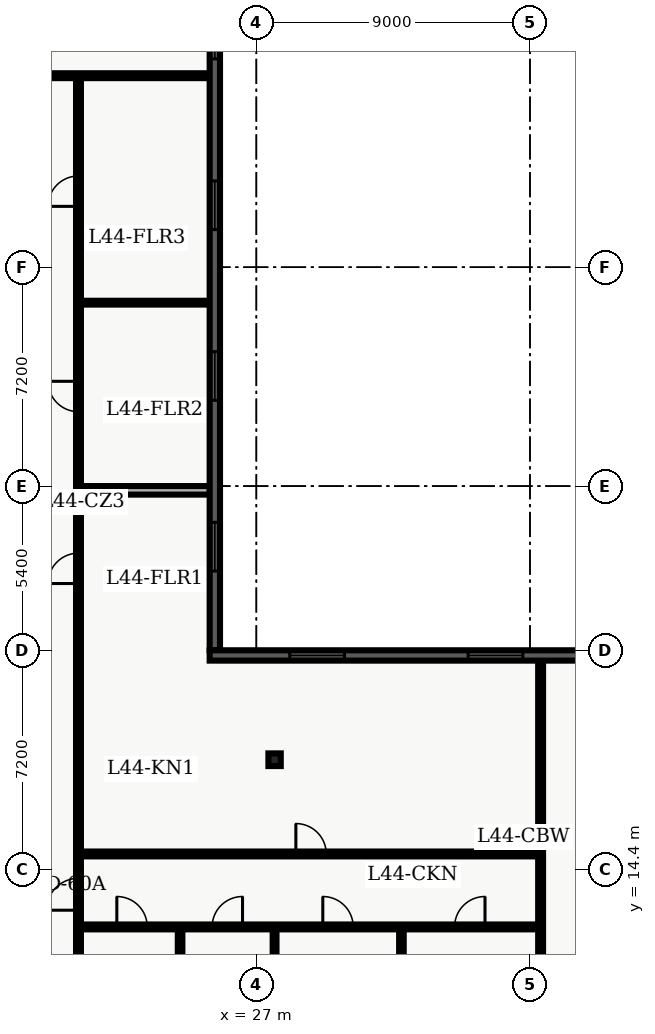
"""IFC4 building model, lengths in metres.
Left out: names, types, materials, properties, quantities, classifications, styles, units other than length and angle.
Written with IfcOpenShell. Run it as: python <this file> out.ifc"""

import sys

from ifc_helpers import new_model, entity, si_unit, converted_unit, direction, frame, origin_with_axes, origin_2d_with_axis, place, context, subcontext, project, spatial, polyline, rectangle, i_section, outline, extrude, element, fill, save


model = new_model("IFC4")
c1 = context("Model", 3, precision=1e-05, world=origin_with_axes(), true_north=direction((0.0, 1.0)))
c2 = subcontext(c1, "Body", "Model", "MODEL_VIEW")
j1 = project(units=[si_unit("LENGTHUNIT", "METRE"), converted_unit("PLANEANGLEUNIT", "DEGREE", entity("IfcPlaneAngleMeasure", 0.017), si_unit("PLANEANGLEUNIT", "RADIAN"), dimensions=[0, 0, 0, 0, 0, 0, 0])], contexts=[c1])
p1 = place(None, origin_with_axes())
s1 = spatial("IfcSite", under=j1, at=p1, CompositionType="ELEMENT")
p2 = place(p1, origin_with_axes())
s2 = spatial("IfcBuilding", under=s1, at=p2, CompositionType="ELEMENT")
p3 = place(p2, frame((0.0, 0.0, 179.7), z_axis=(0.0, 0.0, 1.0), x_axis=(1.0, 0.0, 0.0)))
s3 = spatial("IfcBuildingStorey", under=s2, at=p3, CompositionType="ELEMENT", Elevation=179.7)
p4 = place(p3, frame((27.6, 18.0, 0.0), z_axis=(0.0, 0.0, 1.0), x_axis=(1.0, 0.0, 0.0)))
e1 = element("IfcColumn", 1, at=p4, inside=s3, PredefinedType="COLUMN", context=c2, shape_type="SweptSolid", body=[
    extrude(i_section(OverallWidth=0.406, OverallDepth=0.416, WebThickness=0.03, FlangeThickness=0.048, FilletRadius=0.022, at=origin_2d_with_axis()), origin_with_axes(), (0.0, 0.0, 1.0), 3.9),
])
p5 = place(p3, frame((2.6, 40.5, 0.0), z_axis=(0.0, 0.0, 1.0), x_axis=(1.0, 0.0, 0.0)))
e2 = element("IfcWall", 2, at=p5, inside=s3, PredefinedType="PARTITIONING", context=c2, shape_type="SweptSolid", body=[
    extrude(outline(polyline([(0.0, -0.08), (22.87, -0.08), (22.87, 0.08), (0.0, 0.08), (0.0, -0.08)])), origin_with_axes(), (0.0, 0.0, 1.0), 2.7),
])
p6 = place(p5, frame((2.386, 0.0, 0.0), z_axis=(0.0, 0.0, 1.0), x_axis=(1.0, 0.0, 0.0)))
e3 = element("IfcOpeningElement", 3, at=p6, cuts=e2, PredefinedType="OPENING", context=c2, shape_type="SweptSolid", body=[
    extrude(rectangle(XDim=1.0, YDim=0.18, at=origin_2d_with_axis()), origin_with_axes(), (0.0, 0.0, 1.0), 2.15),
])
p7 = place(p5, frame((7.631, 0.0, 0.0), z_axis=(0.0, 0.0, 1.0), x_axis=(1.0, 0.0, 0.0)))
e4 = element("IfcOpeningElement", 4, at=p7, cuts=e2, PredefinedType="OPENING", context=c2, shape_type="SweptSolid", body=[
    extrude(rectangle(XDim=1.0, YDim=0.18, at=origin_2d_with_axis()), origin_with_axes(), (0.0, 0.0, 1.0), 2.15),
])
p8 = place(p5, frame((13.999, 0.0, 0.0), z_axis=(0.0, 0.0, 1.0), x_axis=(1.0, 0.0, 0.0)))
e5 = element("IfcOpeningElement", 5, at=p8, cuts=e2, PredefinedType="OPENING", context=c2, shape_type="SweptSolid", body=[
    extrude(rectangle(XDim=1.2, YDim=0.18, at=origin_2d_with_axis()), origin_with_axes(), (0.0, 0.0, 1.0), 2.2),
])
p9 = place(p3, frame((21.15, 7.8, 0.0), z_axis=(0.0, 0.0, 1.0), x_axis=(0.0, 1.0, 0.0)))
e6 = element("IfcWall", 6, at=p9, inside=s3, PredefinedType="PARTITIONING", context=c2, shape_type="SweptSolid", body=[
    extrude(outline(polyline([(0.0, -0.08), (32.7, -0.08), (32.7, 0.08), (0.0, 0.08), (0.0, -0.08)])), origin_with_axes(), (0.0, 0.0, 1.0), 2.7),
])
p10 = place(p9, frame((16.495, 0.0, 0.0), z_axis=(0.0, 0.0, 1.0), x_axis=(1.0, 0.0, 0.0)))
e7 = element("IfcOpeningElement", 7, at=p10, cuts=e6, PredefinedType="OPENING", context=c2, shape_type="SweptSolid", body=[
    extrude(rectangle(XDim=1.0, YDim=0.18, at=origin_2d_with_axis()), origin_with_axes(), (0.0, 0.0, 1.0), 2.15),
])
p11 = place(p9, frame((22.148, 0.0, 0.0), z_axis=(0.0, 0.0, 1.0), x_axis=(1.0, 0.0, 0.0)))
e8 = element("IfcOpeningElement", 8, at=p11, cuts=e6, PredefinedType="OPENING", context=c2, shape_type="SweptSolid", body=[
    extrude(rectangle(XDim=1.0, YDim=0.18, at=origin_2d_with_axis()), origin_with_axes(), (0.0, 0.0, 1.0), 2.15),
])
p12 = place(p9, frame((28.902, 0.0, 0.0), z_axis=(0.0, 0.0, 1.0), x_axis=(1.0, 0.0, 0.0)))
e9 = element("IfcOpeningElement", 9, at=p12, cuts=e6, PredefinedType="OPENING", context=c2, shape_type="SweptSolid", body=[
    extrude(rectangle(XDim=1.0, YDim=0.18, at=origin_2d_with_axis()), origin_with_axes(), (0.0, 0.0, 1.0), 2.15),
])
p13 = place(p9, frame((5.775, 0.0, 0.0), z_axis=(0.0, 0.0, 1.0), x_axis=(1.0, 0.0, 0.0)))
e10 = element("IfcOpeningElement", 10, at=p13, cuts=e6, PredefinedType="OPENING", context=c2, shape_type="SweptSolid", body=[
    extrude(rectangle(XDim=1.05, YDim=0.18, at=origin_2d_with_axis()), origin_with_axes(), (0.0, 0.0, 1.0), 2.15),
])
p14 = place(p3, frame((21.3, 26.861, 0.0), z_axis=(0.0, 0.0, 1.0), x_axis=(1.0, 0.0, 0.0)))
e11 = element("IfcWall", 11, at=p14, inside=s3, PredefinedType="PARTITIONING", context=c2, shape_type="SweptSolid", body=[
    extrude(outline(polyline([(0.0, -0.14), (4.17, -0.14), (4.17, 0.14), (0.0, 0.14), (0.0, -0.14)])), origin_with_axes(), (0.0, 0.0, 1.0), 2.7),
])
p15 = place(p3, frame((21.3, 33.034, 0.0), z_axis=(0.0, 0.0, 1.0), x_axis=(1.0, 0.0, 0.0)))
e12 = element("IfcWall", 12, at=p15, inside=s3, PredefinedType="PARTITIONING", context=c2, shape_type="SweptSolid", body=[
    extrude(outline(polyline([(0.0, -0.062), (4.17, -0.062), (4.17, 0.062), (0.0, 0.062), (0.0, -0.062)])), origin_with_axes(), (0.0, 0.0, 1.0), 2.7),
])
p16 = place(p3, frame((21.15, 12.5, 0.0), z_axis=(0.0, 0.0, 1.0), x_axis=(1.0, 0.0, 0.0)))
e13 = element("IfcWall", 13, at=p16, inside=s3, PredefinedType="PARTITIONING", context=c2, shape_type="SweptSolid", body=[
    extrude(outline(polyline([(0.0, -0.08), (15.2, -0.08), (15.2, 0.08), (0.0, 0.08), (0.0, -0.08)])), origin_with_axes(), (0.0, 0.0, 1.0), 2.7),
])
p17 = place(p16, frame((1.761, 0.0, 0.0), z_axis=(0.0, 0.0, 1.0), x_axis=(1.0, 0.0, 0.0)))
e14 = element("IfcOpeningElement", 14, at=p17, cuts=e13, PredefinedType="OPENING", context=c2, shape_type="SweptSolid", body=[
    extrude(rectangle(XDim=1.0, YDim=0.18, at=origin_2d_with_axis()), origin_with_axes(), (0.0, 0.0, 1.0), 2.15),
])
p18 = place(p16, frame((4.896, 0.0, 0.0), z_axis=(0.0, 0.0, 1.0), x_axis=(1.0, 0.0, 0.0)))
e15 = element("IfcOpeningElement", 15, at=p18, cuts=e13, PredefinedType="OPENING", context=c2, shape_type="SweptSolid", body=[
    extrude(rectangle(XDim=1.0, YDim=0.18, at=origin_2d_with_axis()), origin_with_axes(), (0.0, 0.0, 1.0), 2.15),
])
p19 = place(p16, frame((8.536, 0.0, 0.0), z_axis=(0.0, 0.0, 1.0), x_axis=(1.0, 0.0, 0.0)))
e16 = element("IfcOpeningElement", 16, at=p19, cuts=e13, PredefinedType="OPENING", context=c2, shape_type="SweptSolid", body=[
    extrude(rectangle(XDim=1.0, YDim=0.18, at=origin_2d_with_axis()), origin_with_axes(), (0.0, 0.0, 1.0), 2.15),
])
p20 = place(p16, frame((12.871, 0.0, 0.0), z_axis=(0.0, 0.0, 1.0), x_axis=(1.0, 0.0, 0.0)))
e17 = element("IfcOpeningElement", 17, at=p20, cuts=e13, PredefinedType="OPENING", context=c2, shape_type="SweptSolid", body=[
    extrude(rectangle(XDim=1.0, YDim=0.18, at=origin_2d_with_axis()), origin_with_axes(), (0.0, 0.0, 1.0), 2.15),
])
p21 = place(p3, frame((21.15, 14.9, 0.0), z_axis=(0.0, 0.0, 1.0), x_axis=(1.0, 0.0, 0.0)))
e18 = element("IfcWall", 18, at=p21, inside=s3, PredefinedType="PARTITIONING", context=c2, shape_type="SweptSolid", body=[
    extrude(outline(polyline([(0.0, -0.08), (15.2, -0.08), (15.2, 0.08), (0.0, 0.08), (0.0, -0.08)])), origin_with_axes(), (0.0, 0.0, 1.0), 2.7),
])
p22 = place(p21, frame((7.65, 0.0, 0.0), z_axis=(0.0, 0.0, 1.0), x_axis=(1.0, 0.0, 0.0)))
e19 = element("IfcOpeningElement", 19, at=p22, cuts=e18, PredefinedType="OPENING", context=c2, shape_type="SweptSolid", body=[
    extrude(rectangle(XDim=1.0, YDim=0.18, at=origin_2d_with_axis()), origin_with_axes(), (0.0, 0.0, 1.0), 2.15),
])
p23 = place(p3, frame((36.35, 4.35, 0.0), z_axis=(0.0, 0.0, 1.0), x_axis=(0.0, 1.0, 0.0)))
e20 = element("IfcWall", 20, at=p23, inside=s3, PredefinedType="PARTITIONING", context=c2, shape_type="SweptSolid", body=[
    extrude(outline(polyline([(0.0, -0.08), (16.95, -0.08), (16.95, 0.08), (0.0, 0.08), (0.0, -0.08)])), origin_with_axes(), (0.0, 0.0, 1.0), 2.7),
])
p24 = place(p3, frame((24.492, 0.335, 0.0), z_axis=(0.0, 0.0, 1.0), x_axis=(0.0, 1.0, 0.0)))
e21 = element("IfcWall", 21, at=p24, inside=s3, PredefinedType="PARTITIONING", context=c2, shape_type="SweptSolid", body=[
    extrude(outline(polyline([(0.0, -0.075), (12.045, -0.075), (12.045, 0.075), (0.0, 0.075), (0.0, -0.075)])), origin_with_axes(), (0.0, 0.0, 1.0), 2.7),
])
p25 = place(p3, frame((27.6, 0.335, 0.0), z_axis=(0.0, 0.0, 1.0), x_axis=(0.0, 1.0, 0.0)))
e22 = element("IfcWall", 22, at=p25, inside=s3, PredefinedType="PARTITIONING", context=c2, shape_type="SweptSolid", body=[
    extrude(outline(polyline([(0.0, -0.062), (12.045, -0.062), (12.045, 0.062), (0.0, 0.062), (0.0, -0.062)])), origin_with_axes(), (0.0, 0.0, 1.0), 2.7),
])
p26 = place(p3, frame((31.772, 0.335, 0.0), z_axis=(0.0, 0.0, 1.0), x_axis=(0.0, 1.0, 0.0)))
e23 = element("IfcWall", 23, at=p26, inside=s3, PredefinedType="PARTITIONING", context=c2, shape_type="SweptSolid", body=[
    extrude(outline(polyline([(0.0, -0.075), (12.045, -0.075), (12.045, 0.075), (0.0, 0.075), (0.0, -0.075)])), origin_with_axes(), (0.0, 0.0, 1.0), 2.7),
])
p27 = place(p3, frame((25.635, 45.26, 0.0), z_axis=(0.0, 0.0, 1.0), x_axis=(0.0, -1.0, 0.0)))
e24 = element("IfcWall", 24, at=p27, inside=s3, PredefinedType="SOLIDWALL", context=c2, shape_type="SweptSolid", body=[
    extrude(outline(polyline([(0.0, -0.17), (23.66, -0.17), (23.66, 0.17), (0.0, 0.17), (0.0, -0.17)])), origin_with_axes(), (0.0, 0.0, 1.0), 3.66),
])
p28 = place(p27, frame((3.407, 0.0, 0.45), z_axis=(0.0, 0.0, 1.0), x_axis=(1.0, 0.0, 0.0)))
e25 = element("IfcOpeningElement", 25, at=p28, cuts=e24, PredefinedType="OPENING", context=c2, shape_type="SweptSolid", body=[
    extrude(rectangle(XDim=1.6, YDim=0.36, at=origin_2d_with_axis()), origin_with_axes(), (0.0, 0.0, 1.0), 2.2),
])
p29 = place(p27, frame((9.022, 0.0, 0.45), z_axis=(0.0, 0.0, 1.0), x_axis=(1.0, 0.0, 0.0)))
e26 = element("IfcOpeningElement", 26, at=p29, cuts=e24, PredefinedType="OPENING", context=c2, shape_type="SweptSolid", body=[
    extrude(rectangle(XDim=1.6, YDim=0.36, at=origin_2d_with_axis()), origin_with_axes(), (0.0, 0.0, 1.0), 2.2),
])
p30 = place(p27, frame((14.637, 0.0, 0.45), z_axis=(0.0, 0.0, 1.0), x_axis=(1.0, 0.0, 0.0)))
e27 = element("IfcOpeningElement", 27, at=p30, cuts=e24, PredefinedType="OPENING", context=c2, shape_type="SweptSolid", body=[
    extrude(rectangle(XDim=1.6, YDim=0.36, at=origin_2d_with_axis()), origin_with_axes(), (0.0, 0.0, 1.0), 2.2),
])
p31 = place(p27, frame((20.252, 0.0, 0.45), z_axis=(0.0, 0.0, 1.0), x_axis=(1.0, 0.0, 0.0)))
e28 = element("IfcOpeningElement", 28, at=p31, cuts=e24, PredefinedType="OPENING", context=c2, shape_type="SweptSolid", body=[
    extrude(rectangle(XDim=1.6, YDim=0.36, at=origin_2d_with_axis()), origin_with_axes(), (0.0, 0.0, 1.0), 2.2),
])
p32 = place(p3, frame((25.465, 21.43, 0.0), z_axis=(0.0, 0.0, 1.0), x_axis=(1.0, 0.0, 0.0)))
e29 = element("IfcWall", 29, at=p32, inside=s3, PredefinedType="SOLIDWALL", context=c2, shape_type="SweptSolid", body=[
    extrude(outline(polyline([(0.0, -0.17), (12.935, -0.17), (12.935, 0.17), (0.0, 0.17), (0.0, -0.17)])), origin_with_axes(), (0.0, 0.0, 1.0), 3.66),
])
p33 = place(p32, frame((3.534, 0.0, 0.45), z_axis=(0.0, 0.0, 1.0), x_axis=(1.0, 0.0, 0.0)))
e30 = element("IfcOpeningElement", 30, at=p33, cuts=e29, PredefinedType="OPENING", context=c2, shape_type="SweptSolid", body=[
    extrude(rectangle(XDim=1.8, YDim=0.36, at=origin_2d_with_axis()), origin_with_axes(), (0.0, 0.0, 1.0), 2.1),
])
p34 = place(p32, frame((9.401, 0.0, 0.45), z_axis=(0.0, 0.0, 1.0), x_axis=(1.0, 0.0, 0.0)))
e31 = element("IfcOpeningElement", 31, at=p34, cuts=e29, PredefinedType="OPENING", context=c2, shape_type="SweptSolid", body=[
    extrude(rectangle(XDim=1.8, YDim=0.36, at=origin_2d_with_axis()), origin_with_axes(), (0.0, 0.0, 1.0), 2.1),
])
p35 = place(p9, frame((16.495, 0.0, 0.0), z_axis=(0.0, 0.0, 1.0), x_axis=(1.0, 0.0, 0.0)))
e32 = element("IfcDoor", 32, at=p35, inside=s3, OperationType="SINGLE_SWING_LEFT", PredefinedType="DOOR", context=c2, shape_type="SweptSolid", body=[
    extrude(rectangle(XDim=1.0, YDim=0.09, at=origin_2d_with_axis()), origin_with_axes(), (0.0, 0.0, 1.0), 2.15),
])
fill(e7, e32)
p36 = place(p9, frame((22.148, 0.0, 0.0), z_axis=(0.0, 0.0, 1.0), x_axis=(1.0, 0.0, 0.0)))
e33 = element("IfcDoor", 33, at=p36, inside=s3, OperationType="SINGLE_SWING_RIGHT", PredefinedType="DOOR", context=c2, shape_type="SweptSolid", body=[
    extrude(rectangle(XDim=1.0, YDim=0.09, at=origin_2d_with_axis()), origin_with_axes(), (0.0, 0.0, 1.0), 2.15),
])
fill(e8, e33)
p37 = place(p9, frame((28.902, 0.0, 0.0), z_axis=(0.0, 0.0, 1.0), x_axis=(1.0, 0.0, 0.0)))
e34 = element("IfcDoor", 34, at=p37, inside=s3, OperationType="SINGLE_SWING_LEFT", PredefinedType="DOOR", context=c2, shape_type="SweptSolid", body=[
    extrude(rectangle(XDim=1.0, YDim=0.09, at=origin_2d_with_axis()), origin_with_axes(), (0.0, 0.0, 1.0), 2.15),
])
fill(e9, e34)
p38 = place(p9, frame((5.775, 0.0, 0.0), z_axis=(0.0, 0.0, 1.0), x_axis=(1.0, 0.0, 0.0)))
e35 = element("IfcDoor", 35, at=p38, inside=s3, OperationType="SINGLE_SWING_LEFT", PredefinedType="DOOR", context=c2, shape_type="SweptSolid", body=[
    extrude(rectangle(XDim=1.05, YDim=0.09, at=origin_2d_with_axis()), origin_with_axes(), (0.0, 0.0, 1.0), 2.15),
])
fill(e10, e35)
p39 = place(p16, frame((1.761, 0.0, 0.0), z_axis=(0.0, 0.0, 1.0), x_axis=(1.0, 0.0, 0.0)))
e36 = element("IfcDoor", 36, at=p39, inside=s3, OperationType="SINGLE_SWING_LEFT", PredefinedType="DOOR", context=c2, shape_type="SweptSolid", body=[
    extrude(rectangle(XDim=1.0, YDim=0.09, at=origin_2d_with_axis()), origin_with_axes(), (0.0, 0.0, 1.0), 2.15),
])
fill(e14, e36)
p40 = place(p16, frame((4.896, 0.0, 0.0), z_axis=(0.0, 0.0, 1.0), x_axis=(1.0, 0.0, 0.0)))
e37 = element("IfcDoor", 37, at=p40, inside=s3, OperationType="SINGLE_SWING_RIGHT", PredefinedType="DOOR", context=c2, shape_type="SweptSolid", body=[
    extrude(rectangle(XDim=1.0, YDim=0.09, at=origin_2d_with_axis()), origin_with_axes(), (0.0, 0.0, 1.0), 2.15),
])
fill(e15, e37)
p41 = place(p16, frame((8.536, 0.0, 0.0), z_axis=(0.0, 0.0, 1.0), x_axis=(1.0, 0.0, 0.0)))
e38 = element("IfcDoor", 38, at=p41, inside=s3, OperationType="SINGLE_SWING_LEFT", PredefinedType="DOOR", context=c2, shape_type="SweptSolid", body=[
    extrude(rectangle(XDim=1.0, YDim=0.09, at=origin_2d_with_axis()), origin_with_axes(), (0.0, 0.0, 1.0), 2.15),
])
fill(e16, e38)
p42 = place(p16, frame((12.871, 0.0, 0.0), z_axis=(0.0, 0.0, 1.0), x_axis=(1.0, 0.0, 0.0)))
e39 = element("IfcDoor", 39, at=p42, inside=s3, OperationType="SINGLE_SWING_RIGHT", PredefinedType="DOOR", context=c2, shape_type="SweptSolid", body=[
    extrude(rectangle(XDim=1.0, YDim=0.09, at=origin_2d_with_axis()), origin_with_axes(), (0.0, 0.0, 1.0), 2.15),
])
fill(e17, e39)
p43 = place(p21, frame((7.65, 0.0, 0.0), z_axis=(0.0, 0.0, 1.0), x_axis=(1.0, 0.0, 0.0)))
e40 = element("IfcDoor", 40, at=p43, inside=s3, OperationType="SINGLE_SWING_LEFT", PredefinedType="DOOR", context=c2, shape_type="SweptSolid", body=[
    extrude(rectangle(XDim=1.0, YDim=0.09, at=origin_2d_with_axis()), origin_with_axes(), (0.0, 0.0, 1.0), 2.15),
])
fill(e19, e40)
p44 = place(p27, frame((3.407, 0.0, 0.45), z_axis=(0.0, 0.0, 1.0), x_axis=(1.0, 0.0, 0.0)))
e41 = element("IfcWindow", 41, at=p44, inside=s3, PredefinedType="WINDOW", context=c2, shape_type="SweptSolid", body=[
    extrude(rectangle(XDim=1.6, YDim=0.09, at=origin_2d_with_axis()), origin_with_axes(), (0.0, 0.0, 1.0), 2.2),
])
fill(e25, e41)
p45 = place(p27, frame((9.022, 0.0, 0.45), z_axis=(0.0, 0.0, 1.0), x_axis=(1.0, 0.0, 0.0)))
e42 = element("IfcWindow", 42, at=p45, inside=s3, PredefinedType="WINDOW", context=c2, shape_type="SweptSolid", body=[
    extrude(rectangle(XDim=1.6, YDim=0.09, at=origin_2d_with_axis()), origin_with_axes(), (0.0, 0.0, 1.0), 2.2),
])
fill(e26, e42)
p46 = place(p27, frame((14.637, 0.0, 0.45), z_axis=(0.0, 0.0, 1.0), x_axis=(1.0, 0.0, 0.0)))
e43 = element("IfcWindow", 43, at=p46, inside=s3, PredefinedType="WINDOW", context=c2, shape_type="SweptSolid", body=[
    extrude(rectangle(XDim=1.6, YDim=0.09, at=origin_2d_with_axis()), origin_with_axes(), (0.0, 0.0, 1.0), 2.2),
])
fill(e27, e43)
p47 = place(p27, frame((20.252, 0.0, 0.45), z_axis=(0.0, 0.0, 1.0), x_axis=(1.0, 0.0, 0.0)))
e44 = element("IfcWindow", 44, at=p47, inside=s3, PredefinedType="WINDOW", context=c2, shape_type="SweptSolid", body=[
    extrude(rectangle(XDim=1.6, YDim=0.09, at=origin_2d_with_axis()), origin_with_axes(), (0.0, 0.0, 1.0), 2.2),
])
fill(e28, e44)
p48 = place(p32, frame((3.534, 0.0, 0.45), z_axis=(0.0, 0.0, 1.0), x_axis=(1.0, 0.0, 0.0)))
e45 = element("IfcWindow", 45, at=p48, inside=s3, PredefinedType="WINDOW", context=c2, shape_type="SweptSolid", body=[
    extrude(rectangle(XDim=1.8, YDim=0.09, at=origin_2d_with_axis()), origin_with_axes(), (0.0, 0.0, 1.0), 2.1),
])
fill(e30, e45)
p49 = place(p32, frame((9.401, 0.0, 0.45), z_axis=(0.0, 0.0, 1.0), x_axis=(1.0, 0.0, 0.0)))
e46 = element("IfcWindow", 46, at=p49, inside=s3, PredefinedType="WINDOW", context=c2, shape_type="SweptSolid", body=[
    extrude(rectangle(XDim=1.8, YDim=0.09, at=origin_2d_with_axis()), origin_with_axes(), (0.0, 0.0, 1.0), 2.1),
])
fill(e31, e46)
save(model, sys.argv[1])
